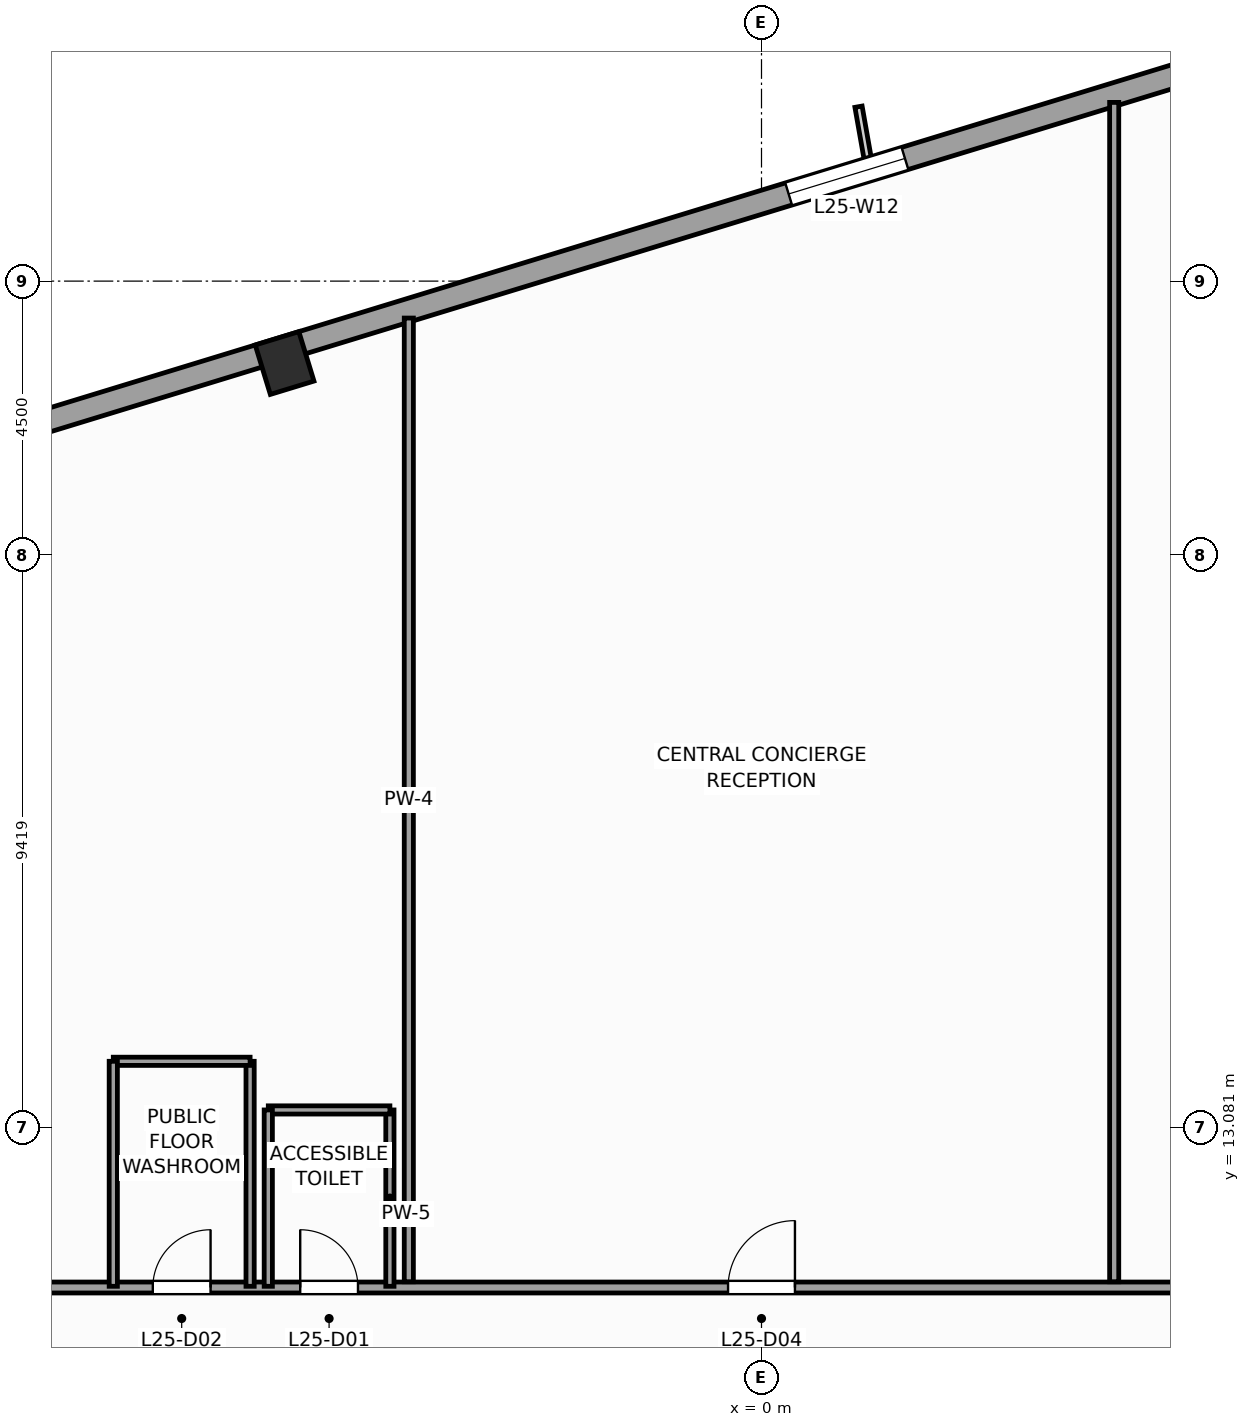
"""IFC4 building model, lengths in metres.
Left out: names, types, materials, properties, quantities, classifications, styles, units other than length and angle.
Written with IfcOpenShell. Run it as: python <this file> out.ifc"""

import sys

from ifc_helpers import new_model, si_unit, direction, frame, frame_2d, origin, origin_2d, place, context, subcontext, project, spatial, rectangle, extrude, source, transform, mapped, element, fill, save


model = new_model("IFC4")
c1 = context("Model", 3, precision=1e-05, world=origin(), true_north=direction((0.0, 1.0)))
c2 = subcontext(c1, "Body", "Model", "MODEL_VIEW")
j1 = project(units=[si_unit("LENGTHUNIT", "METRE"), si_unit("PLANEANGLEUNIT", "RADIAN")], contexts=[c1])
p1 = place(None, origin())
s1 = spatial("IfcSite", under=j1, at=p1, CompositionType="ELEMENT")
p2 = place(p1, origin())
s2 = spatial("IfcBuilding", under=s1, at=p2, CompositionType="ELEMENT")
p3 = place(p2, frame((0.0, 0.0, 107.2)))
s3 = spatial("IfcBuildingStorey", under=s2, at=p3, CompositionType="ELEMENT", Elevation=107.2)
m1 = source(origin(), c2, "Body", "SweptSolid", [
    extrude(rectangle(XDim=0.75, YDim=0.85, at=origin_2d()), origin(), (0.0, 0.0, 1.0), 4.0),
])
p4 = place(p3, frame((-7.843, 25.653, 0.0), z_axis=(0.0, 0.0, 1.0), x_axis=(0.956304755963, 0.292371704723, 0.0)))
e1 = element("IfcColumn", 1, at=p4, inside=s3, PredefinedType="COLUMN", context=c2, shape_type="MappedRepresentation", body=[
    mapped(m1, transform((0.0, 0.0, 0.0), scale=1.0)),
])
p5 = place(p3, frame((14.265, 32.658, 0.0), z_axis=(0.0, 0.0, 1.0), x_axis=(-0.956304320851, -0.292373127906, 0.0)))
e2 = element("IfcWall", 2, at=p5, inside=s3, PredefinedType="STANDARD", context=c2, shape_type="SweptSolid", body=[
    extrude(rectangle(XDim=46.38, YDim=0.38, at=frame_2d((23.19, 0.0))), origin(), (0.0, 0.0, 1.0), 3.14),
])
p6 = place(p5, frame((4.865, 0.0, 0.51)))
e3 = element("IfcOpeningElement", 3, at=p6, cuts=e2, PredefinedType="OPENING", context=c2, shape_type="SweptSolid", body=[
    extrude(rectangle(XDim=1.4, YDim=2.4, at=frame_2d((0.7, 1.2))), frame((0.0, 0.2, 0.0), z_axis=(0.0, -1.0, 0.0), x_axis=(1.0, 0.0, 0.0)), (0.0, 0.0, 1.0), 0.4),
])
p7 = place(p5, frame((12.45, 0.0, 0.51)))
e4 = element("IfcOpeningElement", 4, at=p7, cuts=e2, PredefinedType="OPENING", context=c2, shape_type="SweptSolid", body=[
    extrude(rectangle(XDim=2.0, YDim=2.4, at=frame_2d((1.0, 1.2))), frame((0.0, 0.2, 0.0), z_axis=(0.0, -1.0, 0.0), x_axis=(1.0, 0.0, 0.0)), (0.0, 0.0, 1.0), 0.4),
])
p8 = place(p5, frame((30.538, 0.0, 0.51)))
e5 = element("IfcOpeningElement", 5, at=p8, cuts=e2, PredefinedType="OPENING", context=c2, shape_type="SweptSolid", body=[
    extrude(rectangle(XDim=2.0, YDim=2.4, at=frame_2d((1.0, 1.2))), frame((0.0, 0.2, 0.0), z_axis=(0.0, -1.0, 0.0), x_axis=(1.0, 0.0, 0.0)), (0.0, 0.0, 1.0), 0.4),
])
p9 = place(p5, frame((39.187, 0.0, 0.51)))
e6 = element("IfcOpeningElement", 6, at=p9, cuts=e2, PredefinedType="OPENING", context=c2, shape_type="SweptSolid", body=[
    extrude(rectangle(XDim=1.4, YDim=2.4, at=frame_2d((0.7, 1.2))), frame((0.0, 0.2, 0.0), z_axis=(0.0, -1.0, 0.0), x_axis=(1.0, 0.0, 0.0)), (0.0, 0.0, 1.0), 0.4),
])
p10 = place(p3, frame((-12.6, 10.45, 0.0), z_axis=(0.0, 0.0, 1.0), x_axis=(1.0, 0.0, 0.0)))
e7 = element("IfcWall", 7, at=p10, inside=s3, PredefinedType="PARTITIONING", context=c2, shape_type="SweptSolid", body=[
    extrude(rectangle(XDim=25.2, YDim=0.18, at=frame_2d((12.6, 0.0))), origin(), (0.0, 0.0, 1.0), 3.74),
])
p11 = place(p10, frame((5.014, 0.0, 0.0)))
e8 = element("IfcOpeningElement", 8, at=p11, cuts=e7, PredefinedType="OPENING", context=c2, shape_type="SweptSolid", body=[
    extrude(rectangle(XDim=0.95, YDim=2.1, at=frame_2d((0.475, 1.05))), frame((0.0, 0.1, 0.0), z_axis=(0.0, -1.0, 0.0), x_axis=(1.0, 0.0, 0.0)), (0.0, 0.0, 1.0), 0.2),
])
p12 = place(p10, frame((2.59, 0.0, 0.0)))
e9 = element("IfcOpeningElement", 9, at=p12, cuts=e7, PredefinedType="OPENING", context=c2, shape_type="SweptSolid", body=[
    extrude(rectangle(XDim=0.95, YDim=2.1, at=frame_2d((0.475, 1.05))), frame((0.0, 0.1, 0.0), z_axis=(0.0, -1.0, 0.0), x_axis=(1.0, 0.0, 0.0)), (0.0, 0.0, 1.0), 0.2),
])
p13 = place(p10, frame((12.05, 0.0, 0.0)))
e10 = element("IfcOpeningElement", 10, at=p13, cuts=e7, PredefinedType="OPENING", context=c2, shape_type="SweptSolid", body=[
    extrude(rectangle(XDim=1.1, YDim=2.2, at=frame_2d((0.55, 1.1))), frame((0.0, 0.1, 0.0), z_axis=(0.0, -1.0, 0.0), x_axis=(1.0, 0.0, 0.0)), (0.0, 0.0, 1.0), 0.2),
])
p14 = place(p3, frame((-5.8, 10.545, 0.0), z_axis=(0.0, 0.0, 1.0), x_axis=(0.0, 1.0, 0.0)))
e11 = element("IfcWall", 11, at=p14, inside=s3, PredefinedType="PARTITIONING", context=c2, shape_type="SweptSolid", body=[
    extrude(rectangle(XDim=15.848, YDim=0.15, at=frame_2d((7.924, 0.0))), origin(), (0.0, 0.0, 1.0), 3.74),
])
p15 = place(p3, frame((5.8, 10.545, 0.0), z_axis=(0.0, 0.0, 1.0), x_axis=(0.0, 1.0, 0.0)))
e12 = element("IfcWall", 12, at=p15, inside=s3, PredefinedType="PARTITIONING", context=c2, shape_type="SweptSolid", body=[
    extrude(rectangle(XDim=19.394, YDim=0.15, at=frame_2d((9.697, 0.0))), origin(), (0.0, 0.0, 1.0), 3.74),
])
p16 = place(p3, frame((-6.111, 10.47, 0.0), z_axis=(0.0, 0.0, 1.0), x_axis=(0.0, 1.0, 0.0)))
e13 = element("IfcWall", 13, at=p16, inside=s3, PredefinedType="PARTITIONING", context=c2, shape_type="SweptSolid", body=[
    extrude(rectangle(XDim=2.9, YDim=0.135, at=frame_2d((1.45, 0.0))), origin(), (0.0, 0.0, 1.0), 3.74),
])
p17 = place(p3, frame((-8.111, 13.37, 0.0), z_axis=(0.0, 0.0, 1.0), x_axis=(1.0, 0.0, 0.0)))
e14 = element("IfcWall", 14, at=p17, inside=s3, PredefinedType="PARTITIONING", context=c2, shape_type="SweptSolid", body=[
    extrude(rectangle(XDim=2.0, YDim=0.135, at=frame_2d((1.0, 0.0))), origin(), (0.0, 0.0, 1.0), 2.732),
])
p18 = place(p3, frame((-8.111, 10.47, 0.0), z_axis=(0.0, 0.0, 1.0), x_axis=(0.0, 1.0, 0.0)))
e15 = element("IfcWall", 15, at=p18, inside=s3, PredefinedType="PARTITIONING", context=c2, shape_type="SweptSolid", body=[
    extrude(rectangle(XDim=2.9, YDim=0.135, at=frame_2d((1.45, 0.0))), origin(), (0.0, 0.0, 1.0), 3.74),
])
p19 = place(p3, frame((-8.41, 10.47, 0.0), z_axis=(0.0, 0.0, 1.0), x_axis=(0.0, 1.0, 0.0)))
e16 = element("IfcWall", 16, at=p19, inside=s3, PredefinedType="PARTITIONING", context=c2, shape_type="SweptSolid", body=[
    extrude(rectangle(XDim=3.7, YDim=0.135, at=frame_2d((1.85, 0.0))), origin(), (0.0, 0.0, 1.0), 3.74),
])
p20 = place(p3, frame((-10.66, 14.17, 0.0), z_axis=(0.0, 0.0, 1.0), x_axis=(1.0, 0.0, 0.0)))
e17 = element("IfcWall", 17, at=p20, inside=s3, PredefinedType="PARTITIONING", context=c2, shape_type="SweptSolid", body=[
    extrude(rectangle(XDim=2.25, YDim=0.135, at=frame_2d((1.125, 0.0))), origin(), (0.0, 0.0, 1.0), 3.74),
])
p21 = place(p3, frame((-10.66, 10.47, 0.0), z_axis=(0.0, 0.0, 1.0), x_axis=(0.0, 1.0, 0.0)))
e18 = element("IfcWall", 18, at=p21, inside=s3, PredefinedType="PARTITIONING", context=c2, shape_type="SweptSolid", body=[
    extrude(rectangle(XDim=3.7, YDim=0.135, at=frame_2d((1.85, 0.0))), origin(), (0.0, 0.0, 1.0), 3.74),
])
m2 = source(origin(), c2, "Body", "SweptSolid", [
    extrude(rectangle(XDim=2.0, YDim=2.4, at=frame_2d((1.0, 1.2))), frame((0.0, 0.03, 0.0), z_axis=(0.0, -1.0, 0.0), x_axis=(1.0, 0.0, 0.0)), (0.0, 0.0, 1.0), 0.06),
])
p22 = place(p7, origin())
e19 = element("IfcWindow", 19, at=p22, inside=s3, PartitioningType="SINGLE_PANEL", PredefinedType="WINDOW", context=c2, shape_type="MappedRepresentation", body=[
    mapped(m2, transform((0.0, 0.0, 0.0), scale=1.0)),
])
fill(e4, e19)
m3 = source(origin(), c2, "Body", "SweptSolid", [
    extrude(rectangle(XDim=0.95, YDim=2.1, at=frame_2d((0.475, 1.05))), frame((0.0, 0.025, 0.0), z_axis=(0.0, -1.0, 0.0), x_axis=(1.0, 0.0, 0.0)), (0.0, 0.0, 1.0), 0.05),
])
p23 = place(p11, origin())
e20 = element("IfcDoor", 20, at=p23, inside=s3, OperationType="SINGLE_SWING_LEFT", PredefinedType="DOOR", context=c2, shape_type="MappedRepresentation", body=[
    mapped(m3, transform((0.0, 0.0, 0.0), scale=1.0)),
])
fill(e8, e20)
p24 = place(p12, origin())
e21 = element("IfcDoor", 21, at=p24, inside=s3, OperationType="SINGLE_SWING_RIGHT", PredefinedType="DOOR", context=c2, shape_type="MappedRepresentation", body=[
    mapped(m3, transform((0.0, 0.0, 0.0), scale=1.0)),
])
fill(e9, e21)
m4 = source(origin(), c2, "Body", "SweptSolid", [
    extrude(rectangle(XDim=1.1, YDim=2.2, at=frame_2d((0.55, 1.1))), frame((0.0, 0.025, 0.0), z_axis=(0.0, -1.0, 0.0), x_axis=(1.0, 0.0, 0.0)), (0.0, 0.0, 1.0), 0.05),
])
p25 = place(p13, origin())
e22 = element("IfcDoor", 22, at=p25, inside=s3, OperationType="SINGLE_SWING_RIGHT", PredefinedType="DOOR", context=c2, shape_type="MappedRepresentation", body=[
    mapped(m4, transform((0.0, 0.0, 0.0), scale=1.0)),
])
fill(e10, e22)
save(model, sys.argv[1])
